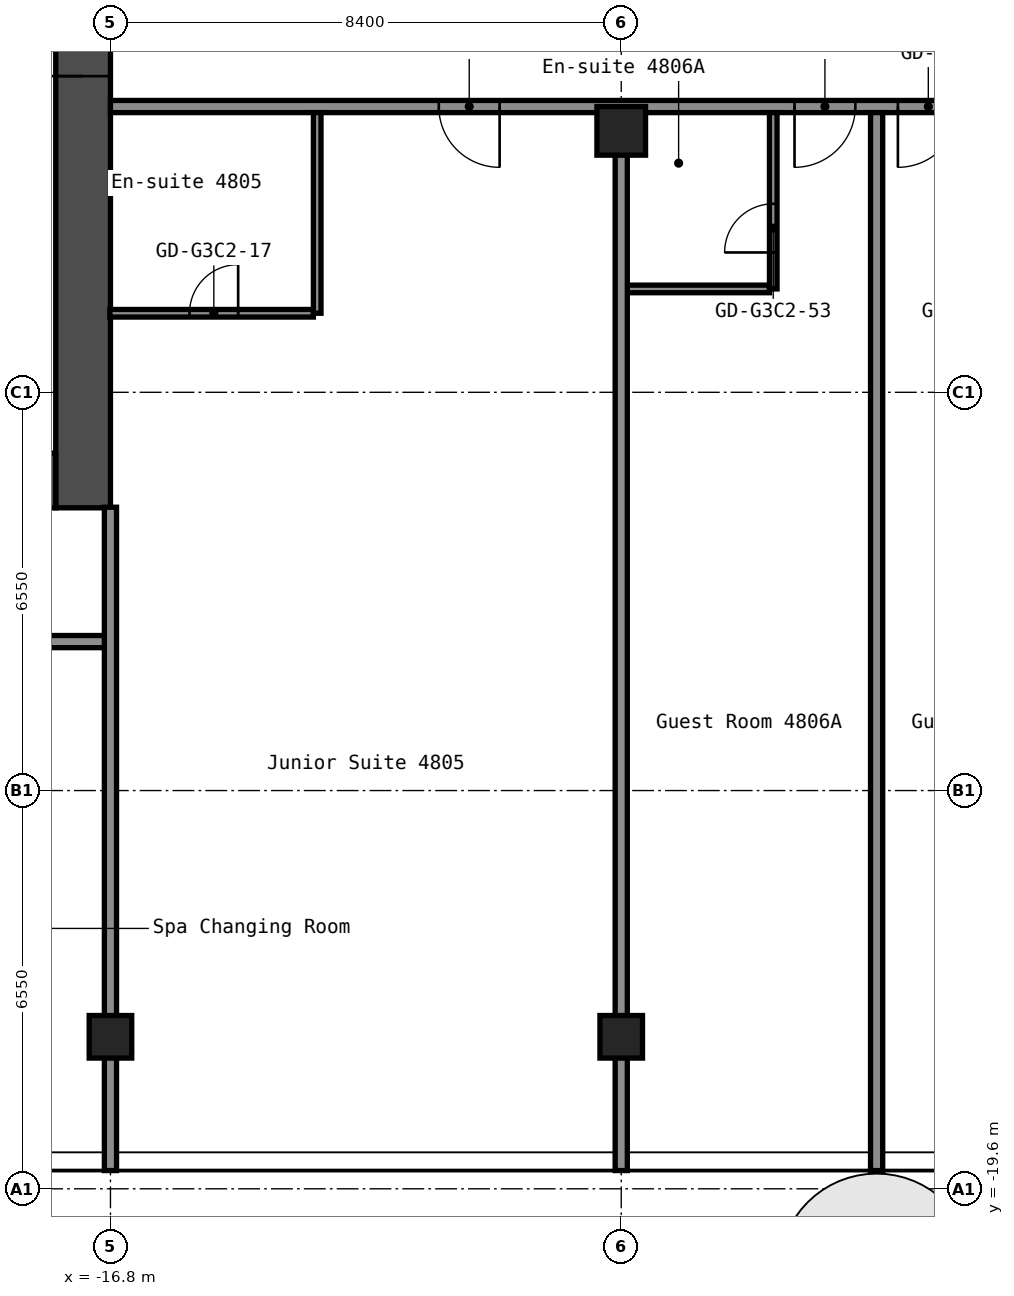
"""IFC4 building model, lengths in metres.
Left out: names, types, materials, properties, quantities, classifications, styles, units other than length and angle.
Written with IfcOpenShell. Run it as: python <this file> out.ifc"""

import sys

from ifc_helpers import new_model, si_unit, direction, frame, frame_2d, origin, origin_2d, place, context, subcontext, project, spatial, rectangle, hollow_rectangle, extrude, element, fill, save


model = new_model("IFC4")
c1 = context("Model", 3, precision=1e-05, world=origin(), true_north=direction((0.0, 1.0)))
c2 = subcontext(c1, "Body", "Model", "MODEL_VIEW")
j1 = project(units=[si_unit("LENGTHUNIT", "METRE"), si_unit("PLANEANGLEUNIT", "RADIAN")], contexts=[c1])
p1 = place(None, origin())
s1 = spatial("IfcSite", under=j1, at=p1, CompositionType="ELEMENT")
p2 = place(p1, origin())
s2 = spatial("IfcBuilding", under=s1, at=p2, CompositionType="ELEMENT")
p3 = place(p2, frame((0.0, 0.0, 169.4)))
s3 = spatial("IfcBuildingStorey", under=s2, at=p3, CompositionType="ELEMENT", Elevation=169.4)
for number, where, z_axis, x_axis in (
    (1, (-16.8, -17.1, 0.0), (0.0, 0.0, 1.0), (1.0, 0.0, 0.0)),
    (2, (-8.4, -17.1, 0.0), (0.0, 0.0, 1.0), (1.0, 0.0, 0.0)),
):
    element("IfcColumn", number, at=place(p3, frame(where, z_axis=z_axis, x_axis=x_axis)), inside=s3, PredefinedType="COLUMN", context=c2, shape_type="SweptSolid", body=[
        extrude(hollow_rectangle(XDim=0.7, YDim=0.7, WallThickness=0.028, at=origin_2d()), origin(), (0.0, 0.0, 1.0), 2.75),
    ])
p4 = place(p3, frame((-8.4, -2.2, 0.0), z_axis=(0.0, 0.0, 1.0), x_axis=(1.0, 0.0, 0.0)))
e3 = element("IfcColumn", 3, at=p4, inside=s3, PredefinedType="COLUMN", context=c2, shape_type="SweptSolid", body=[
    extrude(hollow_rectangle(XDim=0.8, YDim=0.8, WallThickness=0.032, at=origin_2d()), origin(), (0.0, 0.0, 1.0), 2.75),
])
p5 = place(p3, frame((-17.25, -8.4, 0.0), z_axis=(0.0, 0.0, 1.0), x_axis=(0.0, 1.0, 0.0)))
e4 = element("IfcWall", 4, at=p5, inside=s3, PredefinedType="SHEAR", context=c2, shape_type="SweptSolid", body=[
    extrude(rectangle(XDim=16.8, YDim=0.9, at=frame_2d((8.4, 0.0))), origin(), (0.0, 0.0, 1.0), 2.75),
])
p6 = place(p5, frame((7.1, 0.0, 0.0)))
e5 = element("IfcOpeningElement", 5, at=p6, cuts=e4, PredefinedType="OPENING", context=c2, shape_type="SweptSolid", body=[
    extrude(rectangle(XDim=1.6, YDim=2.1, at=frame_2d((0.8, 1.05))), frame((0.0, 0.46, 0.0), z_axis=(0.0, -1.0, 0.0), x_axis=(1.0, 0.0, 0.0)), (0.0, 0.0, 1.0), 0.92),
])
p7 = place(p3, frame((-32.7, -7.95, 0.0), z_axis=(0.0, 0.0, 1.0), x_axis=(1.0, 0.0, 0.0)))
e6 = element("IfcWall", 6, at=p7, inside=s3, PredefinedType="SHEAR", context=c2, shape_type="SweptSolid", body=[
    extrude(rectangle(XDim=15.0, YDim=0.9, at=frame_2d((7.5, 0.0))), origin(), (0.0, 0.0, 1.0), 2.75),
])
p8 = place(p7, frame((11.45, 0.0, 0.0)))
e7 = element("IfcOpeningElement", 7, at=p8, cuts=e6, PredefinedType="OPENING", context=c2, shape_type="SweptSolid", body=[
    extrude(rectangle(XDim=1.0, YDim=2.1, at=frame_2d((0.5, 1.05))), frame((0.0, 0.46, 0.0), z_axis=(0.0, -1.0, 0.0), x_axis=(1.0, 0.0, 0.0)), (0.0, 0.0, 1.0), 0.92),
])
p9 = place(p3, frame((-42.7, -10.6, 0.0), z_axis=(0.0, 0.0, 1.0), x_axis=(1.0, 0.0, 0.0)))
e8 = element("IfcWall", 8, at=p9, inside=s3, PredefinedType="PARTITIONING", context=c2, shape_type="SweptSolid", body=[
    extrude(rectangle(XDim=25.9, YDim=0.2, at=frame_2d((12.95, 0.0))), origin(), (0.0, 0.0, 1.0), 2.75),
])
p10 = place(p9, frame((1.435, 0.0, 0.0)))
e9 = element("IfcOpeningElement", 9, at=p10, cuts=e8, PredefinedType="OPENING", context=c2, shape_type="SweptSolid", body=[
    extrude(rectangle(XDim=0.9, YDim=2.1, at=frame_2d((0.45, 1.05))), frame((0.0, 0.11, 0.0), z_axis=(0.0, -1.0, 0.0), x_axis=(1.0, 0.0, 0.0)), (0.0, 0.0, 1.0), 0.22),
])
p11 = place(p9, frame((5.835, 0.0, 0.0)))
e10 = element("IfcOpeningElement", 10, at=p11, cuts=e8, PredefinedType="OPENING", context=c2, shape_type="SweptSolid", body=[
    extrude(rectangle(XDim=0.9, YDim=2.1, at=frame_2d((0.45, 1.05))), frame((0.0, 0.11, 0.0), z_axis=(0.0, -1.0, 0.0), x_axis=(1.0, 0.0, 0.0)), (0.0, 0.0, 1.0), 0.22),
])
p12 = place(p9, frame((10.415, 0.0, 0.0)))
e11 = element("IfcOpeningElement", 11, at=p12, cuts=e8, PredefinedType="OPENING", context=c2, shape_type="SweptSolid", body=[
    extrude(rectangle(XDim=0.9, YDim=2.1, at=frame_2d((0.45, 1.05))), frame((0.0, 0.11, 0.0), z_axis=(0.0, -1.0, 0.0), x_axis=(1.0, 0.0, 0.0)), (0.0, 0.0, 1.0), 0.22),
])
p13 = place(p9, frame((14.615, 0.0, 0.0)))
e12 = element("IfcOpeningElement", 12, at=p13, cuts=e8, PredefinedType="OPENING", context=c2, shape_type="SweptSolid", body=[
    extrude(rectangle(XDim=0.9, YDim=2.1, at=frame_2d((0.45, 1.05))), frame((0.0, 0.11, 0.0), z_axis=(0.0, -1.0, 0.0), x_axis=(1.0, 0.0, 0.0)), (0.0, 0.0, 1.0), 0.22),
])
p14 = place(p9, frame((19.32, 0.0, 0.0)))
e13 = element("IfcOpeningElement", 13, at=p14, cuts=e8, PredefinedType="OPENING", context=c2, shape_type="SweptSolid", body=[
    extrude(rectangle(XDim=0.9, YDim=2.1, at=frame_2d((0.45, 1.05))), frame((0.0, 0.11, 0.0), z_axis=(0.0, -1.0, 0.0), x_axis=(1.0, 0.0, 0.0)), (0.0, 0.0, 1.0), 0.22),
])
p15 = place(p9, frame((23.52, 0.0, 0.0)))
e14 = element("IfcOpeningElement", 14, at=p15, cuts=e8, PredefinedType="OPENING", context=c2, shape_type="SweptSolid", body=[
    extrude(rectangle(XDim=0.9, YDim=2.1, at=frame_2d((0.45, 1.05))), frame((0.0, 0.11, 0.0), z_axis=(0.0, -1.0, 0.0), x_axis=(1.0, 0.0, 0.0)), (0.0, 0.0, 1.0), 0.22),
])
p16 = place(p3, frame((-16.81, -5.2, 0.0), z_axis=(0.0, 0.0, 1.0), x_axis=(1.0, 0.0, 0.0)))
e15 = element("IfcWall", 15, at=p16, inside=s3, PredefinedType="PARTITIONING", context=c2, shape_type="SweptSolid", body=[
    extrude(rectangle(XDim=3.348, YDim=0.125, at=frame_2d((1.674, 0.0))), origin(), (0.0, 0.0, 1.0), 2.75),
])
p17 = place(p16, frame((1.31, 0.0, 0.0)))
e16 = element("IfcOpeningElement", 16, at=p17, cuts=e15, PredefinedType="OPENING", context=c2, shape_type="SweptSolid", body=[
    extrude(rectangle(XDim=0.8, YDim=2.1, at=frame_2d((0.4, 1.05))), frame((0.0, 0.073, 0.0), z_axis=(0.0, -1.0, 0.0), x_axis=(1.0, 0.0, 0.0)), (0.0, 0.0, 1.0), 0.145),
])
p18 = place(p3, frame((-8.3, -4.8, 0.0), z_axis=(0.0, 0.0, 1.0), x_axis=(1.0, 0.0, 0.0)))
e17 = element("IfcWall", 17, at=p18, inside=s3, PredefinedType="PARTITIONING", context=c2, shape_type="SweptSolid", body=[
    extrude(rectangle(XDim=2.338, YDim=0.125, at=frame_2d((1.169, 0.0))), origin(), (0.0, 0.0, 1.0), 2.75),
])
p19 = place(p3, frame((-16.8, -1.8, 0.0), z_axis=(0.0, 0.0, 1.0), x_axis=(1.0, 0.0, 0.0)))
e18 = element("IfcWall", 18, at=p19, inside=s3, PredefinedType="PARTITIONING", context=c2, shape_type="SweptSolid", body=[
    extrude(rectangle(XDim=33.6, YDim=0.2, at=frame_2d((16.8, 0.0))), origin(), (0.0, 0.0, 1.0), 2.75),
])
p20 = place(p19, frame((5.4, 0.0, 0.0)))
e19 = element("IfcOpeningElement", 19, at=p20, cuts=e18, PredefinedType="OPENING", context=c2, shape_type="SweptSolid", body=[
    extrude(rectangle(XDim=1.0, YDim=2.1, at=frame_2d((0.5, 1.05))), frame((0.0, 0.11, 0.0), z_axis=(0.0, -1.0, 0.0), x_axis=(1.0, 0.0, 0.0)), (0.0, 0.0, 1.0), 0.22),
])
p21 = place(p19, frame((11.25, 0.0, 0.0)))
e20 = element("IfcOpeningElement", 20, at=p21, cuts=e18, PredefinedType="OPENING", context=c2, shape_type="SweptSolid", body=[
    extrude(rectangle(XDim=1.0, YDim=2.1, at=frame_2d((0.5, 1.05))), frame((0.0, 0.11, 0.0), z_axis=(0.0, -1.0, 0.0), x_axis=(1.0, 0.0, 0.0)), (0.0, 0.0, 1.0), 0.22),
])
p22 = place(p19, frame((12.95, 0.0, 0.0)))
e21 = element("IfcOpeningElement", 21, at=p22, cuts=e18, PredefinedType="OPENING", context=c2, shape_type="SweptSolid", body=[
    extrude(rectangle(XDim=1.0, YDim=2.1, at=frame_2d((0.5, 1.05))), frame((0.0, 0.11, 0.0), z_axis=(0.0, -1.0, 0.0), x_axis=(1.0, 0.0, 0.0)), (0.0, 0.0, 1.0), 0.22),
])
p23 = place(p19, frame((18.785, 0.0, 0.0)))
e22 = element("IfcOpeningElement", 22, at=p23, cuts=e18, PredefinedType="OPENING", context=c2, shape_type="SweptSolid", body=[
    extrude(rectangle(XDim=0.9, YDim=2.1, at=frame_2d((0.45, 1.05))), frame((0.0, 0.11, 0.0), z_axis=(0.0, -1.0, 0.0), x_axis=(1.0, 0.0, 0.0)), (0.0, 0.0, 1.0), 0.22),
])
p24 = place(p19, frame((22.985, 0.0, 0.0)))
e23 = element("IfcOpeningElement", 23, at=p24, cuts=e18, PredefinedType="OPENING", context=c2, shape_type="SweptSolid", body=[
    extrude(rectangle(XDim=0.9, YDim=2.1, at=frame_2d((0.45, 1.05))), frame((0.0, 0.11, 0.0), z_axis=(0.0, -1.0, 0.0), x_axis=(1.0, 0.0, 0.0)), (0.0, 0.0, 1.0), 0.22),
])
p25 = place(p19, frame((28.05, 0.0, 0.0)))
e24 = element("IfcOpeningElement", 24, at=p25, cuts=e18, PredefinedType="OPENING", context=c2, shape_type="SweptSolid", body=[
    extrude(rectangle(XDim=1.0, YDim=2.1, at=frame_2d((0.5, 1.05))), frame((0.0, 0.11, 0.0), z_axis=(0.0, -1.0, 0.0), x_axis=(1.0, 0.0, 0.0)), (0.0, 0.0, 1.0), 0.22),
])
p26 = place(p19, frame((29.75, 0.0, 0.0)))
e25 = element("IfcOpeningElement", 25, at=p26, cuts=e18, PredefinedType="OPENING", context=c2, shape_type="SweptSolid", body=[
    extrude(rectangle(XDim=1.0, YDim=2.1, at=frame_2d((0.5, 1.05))), frame((0.0, 0.11, 0.0), z_axis=(0.0, -1.0, 0.0), x_axis=(1.0, 0.0, 0.0)), (0.0, 0.0, 1.0), 0.22),
])
p27 = place(p3, frame((-16.8, -19.3, 0.0), z_axis=(0.0, 0.0, 1.0), x_axis=(0.0, 1.0, 0.0)))
e26 = element("IfcWall", 26, at=p27, inside=s3, PredefinedType="PARTITIONING", context=c2, shape_type="SweptSolid", body=[
    extrude(rectangle(XDim=10.91, YDim=0.2, at=frame_2d((5.455, 0.0))), origin(), (0.0, 0.0, 1.0), 2.75),
])
p28 = place(p3, frame((-13.4, -5.2, 0.0), z_axis=(0.0, 0.0, 1.0), x_axis=(0.0, 1.0, 0.0)))
e27 = element("IfcWall", 27, at=p28, inside=s3, PredefinedType="PARTITIONING", context=c2, shape_type="SweptSolid", body=[
    extrude(rectangle(XDim=3.3, YDim=0.125, at=frame_2d((1.65, 0.0))), origin(), (0.0, 0.0, 1.0), 2.75),
])
p29 = place(p3, frame((-8.4, -19.3, 0.0), z_axis=(0.0, 0.0, 1.0), x_axis=(0.0, 1.0, 0.0)))
e28 = element("IfcWall", 28, at=p29, inside=s3, PredefinedType="PARTITIONING", context=c2, shape_type="SweptSolid", body=[
    extrude(rectangle(XDim=16.71, YDim=0.2, at=frame_2d((8.355, 0.0))), origin(), (0.0, 0.0, 1.0), 2.75),
])
p30 = place(p3, frame((-5.9, -4.8, 0.0), z_axis=(0.0, 0.0, 1.0), x_axis=(0.0, 1.0, 0.0)))
e29 = element("IfcWall", 29, at=p30, inside=s3, PredefinedType="PARTITIONING", context=c2, shape_type="SweptSolid", body=[
    extrude(rectangle(XDim=2.9, YDim=0.125, at=frame_2d((1.45, 0.0))), origin(), (0.0, 0.0, 1.0), 2.75),
])
p31 = place(p30, frame((0.6, 0.0, 0.0)))
e30 = element("IfcOpeningElement", 30, at=p31, cuts=e29, PredefinedType="OPENING", context=c2, shape_type="SweptSolid", body=[
    extrude(rectangle(XDim=0.8, YDim=2.1, at=frame_2d((0.4, 1.05))), frame((0.0, 0.073, 0.0), z_axis=(0.0, -1.0, 0.0), x_axis=(1.0, 0.0, 0.0)), (0.0, 0.0, 1.0), 0.145),
])
p32 = place(p3, frame((-4.2, -19.3, 0.0), z_axis=(0.0, 0.0, 1.0), x_axis=(0.0, 1.0, 0.0)))
e31 = element("IfcWall", 31, at=p32, inside=s3, PredefinedType="PARTITIONING", context=c2, shape_type="SweptSolid", body=[
    extrude(rectangle(XDim=17.4, YDim=0.2, at=frame_2d((8.7, 0.0))), origin(), (0.0, 0.0, 1.0), 2.75),
])
p33 = place(p6, origin())
e32 = element("IfcDoor", 32, at=p33, inside=s3, OperationType="DOUBLE_DOOR_SINGLE_SWING", PredefinedType="DOOR", context=c2, shape_type="SweptSolid", body=[
    extrude(rectangle(XDim=1.6, YDim=2.1, at=frame_2d((0.8, 1.05))), frame((0.0, 0.025, 0.0), z_axis=(0.0, -1.0, 0.0), x_axis=(1.0, 0.0, 0.0)), (0.0, 0.0, 1.0), 0.05),
])
fill(e5, e32)
p34 = place(p17, origin())
e33 = element("IfcDoor", 33, at=p34, inside=s3, OperationType="SINGLE_SWING_LEFT", PredefinedType="DOOR", context=c2, shape_type="SweptSolid", body=[
    extrude(rectangle(XDim=0.8, YDim=2.1, at=frame_2d((0.4, 1.05))), frame((0.0, 0.025, 0.0), z_axis=(0.0, -1.0, 0.0), x_axis=(1.0, 0.0, 0.0)), (0.0, 0.0, 1.0), 0.05),
])
fill(e16, e33)
p35 = place(p20, origin())
e34 = element("IfcDoor", 34, at=p35, inside=s3, OperationType="SINGLE_SWING_RIGHT", PredefinedType="DOOR", context=c2, shape_type="SweptSolid", body=[
    extrude(rectangle(XDim=1.0, YDim=2.1, at=frame_2d((0.5, 1.05))), frame((0.0, 0.025, 0.0), z_axis=(0.0, -1.0, 0.0), x_axis=(1.0, 0.0, 0.0)), (0.0, 0.0, 1.0), 0.05),
])
fill(e19, e34)
p36 = place(p21, origin())
e35 = element("IfcDoor", 35, at=p36, inside=s3, OperationType="SINGLE_SWING_LEFT", PredefinedType="DOOR", context=c2, shape_type="SweptSolid", body=[
    extrude(rectangle(XDim=1.0, YDim=2.1, at=frame_2d((0.5, 1.05))), frame((0.0, 0.025, 0.0), z_axis=(0.0, -1.0, 0.0), x_axis=(1.0, 0.0, 0.0)), (0.0, 0.0, 1.0), 0.05),
])
fill(e20, e35)
p37 = place(p22, origin())
e36 = element("IfcDoor", 36, at=p37, inside=s3, OperationType="SINGLE_SWING_LEFT", PredefinedType="DOOR", context=c2, shape_type="SweptSolid", body=[
    extrude(rectangle(XDim=1.0, YDim=2.1, at=frame_2d((0.5, 1.05))), frame((0.0, 0.025, 0.0), z_axis=(0.0, -1.0, 0.0), x_axis=(1.0, 0.0, 0.0)), (0.0, 0.0, 1.0), 0.05),
])
fill(e21, e36)
p38 = place(p31, origin())
e37 = element("IfcDoor", 37, at=p38, inside=s3, OperationType="SINGLE_SWING_RIGHT", PredefinedType="DOOR", context=c2, shape_type="SweptSolid", body=[
    extrude(rectangle(XDim=0.8, YDim=2.1, at=frame_2d((0.4, 1.05))), frame((0.0, 0.025, 0.0), z_axis=(0.0, -1.0, 0.0), x_axis=(1.0, 0.0, 0.0)), (0.0, 0.0, 1.0), 0.05),
])
fill(e30, e37)
save(model, sys.argv[1])
